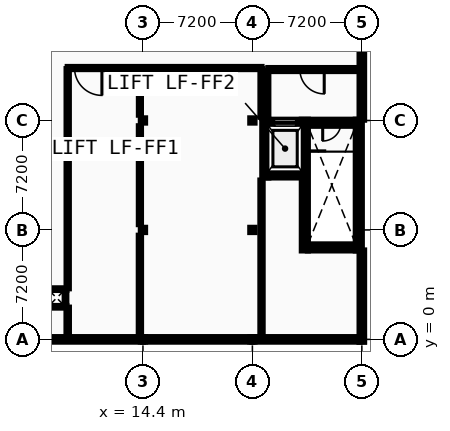
"""IFC4 building model, lengths in metres.
Left out: names, types, materials, properties, quantities, classifications, styles, units other than length and angle.
Written with IfcOpenShell. Run it as: python <this file> out.ifc"""

import sys

from ifc_helpers import new_model, si_unit, direction, frame, frame_2d, origin, origin_2d, place, context, subcontext, project, spatial, rectangle, i_section, extrude, element, fill, save


model = new_model("IFC4")
c1 = context("Model", 3, precision=1e-05, world=origin(), true_north=direction((0.0, 1.0)))
c2 = subcontext(c1, "Body", "Model", "MODEL_VIEW")
j1 = project(units=[si_unit("LENGTHUNIT", "METRE"), si_unit("PLANEANGLEUNIT", "RADIAN")], contexts=[c1])
p1 = place(None, origin())
s1 = spatial("IfcSite", under=j1, at=p1, CompositionType="ELEMENT")
p2 = place(p1, origin())
s2 = spatial("IfcBuilding", under=s1, at=p2, CompositionType="ELEMENT")
p3 = place(p2, frame((0.0, 0.0, 27.2)))
s3 = spatial("IfcBuildingStorey", under=s2, at=p3, CompositionType="ELEMENT", Elevation=27.2)
for number, where, z_axis, x_axis in (
    (1, (14.4, 0.0, 0.0), (0.0, 0.0, 1.0), (1.0, 0.0, 0.0)),
    (2, (14.4, 7.2, 0.0), (0.0, 0.0, 1.0), (1.0, 0.0, 0.0)),
    (3, (14.4, 14.4, 0.0), (0.0, 0.0, 1.0), (1.0, 0.0, 0.0)),
    (4, (21.6, 0.0, 0.0), (0.0, 0.0, 1.0), (1.0, 0.0, 0.0)),
    (5, (21.6, 7.2, 0.0), (0.0, 0.0, 1.0), (1.0, 0.0, 0.0)),
    (6, (21.6, 14.4, 0.0), (0.0, 0.0, 1.0), (1.0, 0.0, 0.0)),
    (7, (28.8, 0.0, 0.0), (0.0, 0.0, 1.0), (1.0, 0.0, 0.0)),
):
    element("IfcColumn", number, at=place(p3, frame(where, z_axis=z_axis, x_axis=x_axis)), inside=s3, PredefinedType="COLUMN", context=c2, shape_type="SweptSolid", body=[
        extrude(i_section(OverallWidth=0.28, OverallDepth=0.28, WebThickness=0.01, FlangeThickness=0.018, FilletRadius=0.024, at=origin_2d()), origin(), (0.0, 0.0, 1.0), 4.4),
    ])
p4 = place(p3, frame((7.2, 0.0, 0.0), z_axis=(0.0, 0.0, 1.0), x_axis=(1.0, 0.0, 0.0)))
e8 = element("IfcWall", 8, at=p4, inside=s3, PredefinedType="STANDARD", context=c2, shape_type="SweptSolid", body=[
    extrude(rectangle(XDim=7.2, YDim=0.3, at=frame_2d((3.6, 0.0))), origin(), (0.0, 0.0, 1.0), 4.035),
])
p5 = place(p4, frame((4.593, 0.0, 0.95)))
e9 = element("IfcOpeningElement", 9, at=p5, cuts=e8, PredefinedType="OPENING", context=c2, shape_type="SweptSolid", body=[
    extrude(rectangle(XDim=0.894, YDim=1.26, at=frame_2d((0.447, 0.63))), frame((0.0, 0.16, 0.0), z_axis=(0.0, -1.0, 0.0), x_axis=(1.0, 0.0, 0.0)), (0.0, 0.0, 1.0), 0.32),
])
p6 = place(p3, frame((14.4, 0.0, 0.0), z_axis=(0.0, 0.0, 1.0), x_axis=(1.0, 0.0, 0.0)))
e10 = element("IfcWall", 10, at=p6, inside=s3, PredefinedType="STANDARD", context=c2, shape_type="SweptSolid", body=[
    extrude(rectangle(XDim=7.2, YDim=0.3, at=frame_2d((3.6, 0.0))), origin(), (0.0, 0.0, 1.0), 4.035),
])
p7 = place(p6, frame((1.696, 0.0, 0.95)))
e11 = element("IfcOpeningElement", 11, at=p7, cuts=e10, PredefinedType="OPENING", context=c2, shape_type="SweptSolid", body=[
    extrude(rectangle(XDim=0.928, YDim=1.26, at=frame_2d((0.464, 0.63))), frame((0.0, 0.16, 0.0), z_axis=(0.0, -1.0, 0.0), x_axis=(1.0, 0.0, 0.0)), (0.0, 0.0, 1.0), 0.32),
])
p8 = place(p6, frame((4.576, 0.0, 0.95)))
e12 = element("IfcOpeningElement", 12, at=p8, cuts=e10, PredefinedType="OPENING", context=c2, shape_type="SweptSolid", body=[
    extrude(rectangle(XDim=0.928, YDim=1.26, at=frame_2d((0.464, 0.63))), frame((0.0, 0.16, 0.0), z_axis=(0.0, -1.0, 0.0), x_axis=(1.0, 0.0, 0.0)), (0.0, 0.0, 1.0), 0.32),
])
p9 = place(p3, frame((21.6, 0.0, 0.0), z_axis=(0.0, 0.0, 1.0), x_axis=(1.0, 0.0, 0.0)))
e13 = element("IfcWall", 13, at=p9, inside=s3, PredefinedType="STANDARD", context=c2, shape_type="SweptSolid", body=[
    extrude(rectangle(XDim=7.05, YDim=0.3, at=frame_2d((3.525, 0.0))), origin(), (0.0, 0.0, 1.0), 4.035),
])
p10 = place(p9, frame((1.634, 0.0, 0.95)))
e14 = element("IfcOpeningElement", 14, at=p10, cuts=e13, PredefinedType="OPENING", context=c2, shape_type="SweptSolid", body=[
    extrude(rectangle(XDim=0.962, YDim=1.26, at=frame_2d((0.481, 0.63))), frame((0.0, 0.16, 0.0), z_axis=(0.0, -1.0, 0.0), x_axis=(1.0, 0.0, 0.0)), (0.0, 0.0, 1.0), 0.32),
])
p11 = place(p9, frame((4.454, 0.0, 0.95)))
e15 = element("IfcOpeningElement", 15, at=p11, cuts=e13, PredefinedType="OPENING", context=c2, shape_type="SweptSolid", body=[
    extrude(rectangle(XDim=0.962, YDim=1.26, at=frame_2d((0.481, 0.63))), frame((0.0, 0.16, 0.0), z_axis=(0.0, -1.0, 0.0), x_axis=(1.0, 0.0, 0.0)), (0.0, 0.0, 1.0), 0.32),
])
p12 = place(p3, frame((28.8, -0.15, 0.0), z_axis=(0.0, 0.0, 1.0), x_axis=(0.0, 1.0, 0.0)))
e16 = element("IfcWall", 16, at=p12, inside=s3, PredefinedType="STANDARD", context=c2, shape_type="SweptSolid", body=[
    extrude(rectangle(XDim=6.0, YDim=0.3, at=frame_2d((3.0, 0.0))), origin(), (0.0, 0.0, 1.0), 4.18),
])
p13 = place(p12, frame((2.4, 0.0, 0.95)))
e17 = element("IfcOpeningElement", 17, at=p13, cuts=e16, PredefinedType="OPENING", context=c2, shape_type="SweptSolid", body=[
    extrude(rectangle(XDim=1.2, YDim=1.26, at=frame_2d((0.6, 0.63))), frame((0.0, 0.16, 0.0), z_axis=(0.0, -1.0, 0.0), x_axis=(1.0, 0.0, 0.0)), (0.0, 0.0, 1.0), 0.32),
])
p14 = place(p3, frame((28.8, 14.45, 0.0), z_axis=(0.0, 0.0, 1.0), x_axis=(0.0, 1.0, 0.0)))
e18 = element("IfcWall", 18, at=p14, inside=s3, PredefinedType="STANDARD", context=c2, shape_type="SweptSolid", body=[
    extrude(rectangle(XDim=7.15, YDim=0.3, at=frame_2d((3.575, 0.0))), origin(), (0.0, 0.0, 1.0), 4.18),
])
p15 = place(p14, frame((1.528, 0.0, 0.95)))
e19 = element("IfcOpeningElement", 19, at=p15, cuts=e18, PredefinedType="OPENING", context=c2, shape_type="SweptSolid", body=[
    extrude(rectangle(XDim=1.234, YDim=1.26, at=frame_2d((0.617, 0.63))), frame((0.0, 0.16, 0.0), z_axis=(0.0, -1.0, 0.0), x_axis=(1.0, 0.0, 0.0)), (0.0, 0.0, 1.0), 0.32),
])
p16 = place(p14, frame((4.388, 0.0, 0.95)))
e20 = element("IfcOpeningElement", 20, at=p16, cuts=e18, PredefinedType="OPENING", context=c2, shape_type="SweptSolid", body=[
    extrude(rectangle(XDim=1.234, YDim=1.26, at=frame_2d((0.617, 0.63))), frame((0.0, 0.16, 0.0), z_axis=(0.0, -1.0, 0.0), x_axis=(1.0, 0.0, 0.0)), (0.0, 0.0, 1.0), 0.32),
])
p17 = place(p3, frame((25.25, 6.05, 0.0), z_axis=(0.0, 0.0, 1.0), x_axis=(1.0, 0.0, 0.0)))
e21 = element("IfcWall", 21, at=p17, inside=s3, PredefinedType="SHEAR", context=c2, shape_type="SweptSolid", body=[
    extrude(rectangle(XDim=3.15, YDim=0.4, at=frame_2d((1.575, 0.0))), origin(), (0.0, 0.0, 1.0), 4.18),
])
p18 = place(p3, frame((25.25, 14.25, 0.0), z_axis=(0.0, 0.0, 1.0), x_axis=(1.0, 0.0, 0.0)))
e22 = element("IfcWall", 22, at=p18, inside=s3, PredefinedType="SHEAR", context=c2, shape_type="SweptSolid", body=[
    extrude(rectangle(XDim=3.15, YDim=0.4, at=frame_2d((1.575, 0.0))), origin(), (0.0, 0.0, 1.0), 4.18),
])
p19 = place(p18, frame((0.975, 0.0, 0.0)))
e23 = element("IfcOpeningElement", 23, at=p19, cuts=e22, PredefinedType="OPENING", context=c2, shape_type="SweptSolid", body=[
    extrude(rectangle(XDim=1.2, YDim=2.15, at=frame_2d((0.6, 1.075))), frame((0.0, 0.21, 0.0), z_axis=(0.0, -1.0, 0.0), x_axis=(1.0, 0.0, 0.0)), (0.0, 0.0, 1.0), 0.42),
])
for number, where, z_axis, x_axis in (
    (24, (25.05, 5.85, 0.0), (0.0, 0.0, 1.0), (0.0, 1.0, 0.0)),
    (25, (28.6, 5.85, 0.0), (0.0, 0.0, 1.0), (0.0, 1.0, 0.0)),
):
    element("IfcWall", number, at=place(p3, frame(where, z_axis=z_axis, x_axis=x_axis)), inside=s3, PredefinedType="SHEAR", context=c2, shape_type="SweptSolid", body=[
        extrude(rectangle(XDim=8.6, YDim=0.4, at=frame_2d((4.3, 0.0))), origin(), (0.0, 0.0, 1.0), 4.18),
    ])
p20 = place(p3, frame((22.65, 10.85, 0.0), z_axis=(0.0, 0.0, 1.0), x_axis=(1.0, 0.0, 0.0)))
e26 = element("IfcWall", 26, at=p20, inside=s3, PredefinedType="SHEAR", context=c2, shape_type="SweptSolid", body=[
    extrude(rectangle(XDim=2.2, YDim=0.4, at=frame_2d((1.1, 0.0))), origin(), (0.0, 0.0, 1.0), 4.18),
])
p21 = place(p3, frame((22.65, 14.25, 0.0), z_axis=(0.0, 0.0, 1.0), x_axis=(1.0, 0.0, 0.0)))
e27 = element("IfcWall", 27, at=p21, inside=s3, PredefinedType="SHEAR", context=c2, shape_type="SweptSolid", body=[
    extrude(rectangle(XDim=2.2, YDim=0.4, at=frame_2d((1.1, 0.0))), origin(), (0.0, 0.0, 1.0), 4.18),
])
p22 = place(p21, frame((0.4, 0.0, 0.0)))
e28 = element("IfcOpeningElement", 28, at=p22, cuts=e27, PredefinedType="OPENING", context=c2, shape_type="SweptSolid", body=[
    extrude(rectangle(XDim=1.4, YDim=2.2, at=frame_2d((0.7, 1.1))), frame((0.0, 0.21, 0.0), z_axis=(0.0, -1.0, 0.0), x_axis=(1.0, 0.0, 0.0)), (0.0, 0.0, 1.0), 0.42),
])
p23 = place(p3, frame((22.45, 10.65, 0.0), z_axis=(0.0, 0.0, 1.0), x_axis=(0.0, 1.0, 0.0)))
e29 = element("IfcWall", 29, at=p23, inside=s3, PredefinedType="SHEAR", context=c2, shape_type="SweptSolid", body=[
    extrude(rectangle(XDim=3.8, YDim=0.4, at=frame_2d((1.9, 0.0))), origin(), (0.0, 0.0, 1.0), 4.18),
])
p24 = place(p3, frame((22.65, 17.75, 0.0), z_axis=(0.0, 0.0, 1.0), x_axis=(1.0, 0.0, 0.0)))
e30 = element("IfcWall", 30, at=p24, inside=s3, PredefinedType="PARTITIONING", context=c2, shape_type="SweptSolid", body=[
    extrude(rectangle(XDim=5.75, YDim=0.2, at=frame_2d((2.875, 0.0))), origin(), (0.0, 0.0, 1.0), 4.18),
])
p25 = place(p24, frame((2.075, 0.0, 0.0)))
e31 = element("IfcOpeningElement", 31, at=p25, cuts=e30, PredefinedType="OPENING", context=c2, shape_type="SweptSolid", body=[
    extrude(rectangle(XDim=1.6, YDim=2.2, at=frame_2d((0.8, 1.1))), frame((0.0, 0.11, 0.0), z_axis=(0.0, -1.0, 0.0), x_axis=(1.0, 0.0, 0.0)), (0.0, 0.0, 1.0), 0.22),
])
p26 = place(p3, frame((22.55, 14.45, 0.0), z_axis=(0.0, 0.0, 1.0), x_axis=(0.0, 1.0, 0.0)))
e32 = element("IfcWall", 32, at=p26, inside=s3, PredefinedType="PARTITIONING", context=c2, shape_type="SweptSolid", body=[
    extrude(rectangle(XDim=3.2, YDim=0.2, at=frame_2d((1.6, 0.0))), origin(), (0.0, 0.0, 1.0), 4.18),
])
for number, where, z_axis, x_axis in (
    (33, (8.09, 2.145, 0.0), (0.0, 0.0, 1.0), (1.0, 0.0, 0.0)),
    (34, (8.09, 3.305, 0.0), (0.0, 0.0, 1.0), (1.0, 0.0, 0.0)),
):
    element("IfcWall", number, at=place(p3, frame(where, z_axis=z_axis, x_axis=x_axis)), inside=s3, PredefinedType="PARTITIONING", context=c2, shape_type="SweptSolid", body=[
        extrude(rectangle(XDim=1.27, YDim=0.11, at=frame_2d((0.635, 0.0))), origin(), (0.0, 0.0, 1.0), 4.18),
    ])
p27 = place(p3, frame((9.305, 2.2, 0.0), z_axis=(0.0, 0.0, 1.0), x_axis=(0.0, 1.0, 0.0)))
e35 = element("IfcWall", 35, at=p27, inside=s3, PredefinedType="PARTITIONING", context=c2, shape_type="SweptSolid", body=[
    extrude(rectangle(XDim=1.05, YDim=0.11, at=frame_2d((0.525, 0.0))), origin(), (0.0, 0.0, 1.0), 4.18),
])
p28 = place(p3, frame((9.45, 17.85, 0.0), z_axis=(0.0, 0.0, 1.0), x_axis=(1.0, 0.0, 0.0)))
e36 = element("IfcWall", 36, at=p28, inside=s3, PredefinedType="PARTITIONING", context=c2, shape_type="SweptSolid", body=[
    extrude(rectangle(XDim=12.75, YDim=0.142, at=frame_2d((6.375, 0.0))), origin(), (0.0, 0.0, 1.0), 4.18),
])
p29 = place(p28, frame((0.45, 0.0, 0.0)))
e37 = element("IfcOpeningElement", 37, at=p29, cuts=e36, PredefinedType="OPENING", context=c2, shape_type="SweptSolid", body=[
    extrude(rectangle(XDim=1.8, YDim=2.3, at=frame_2d((0.9, 1.15))), frame((0.0, 0.081, 0.0), z_axis=(0.0, -1.0, 0.0), x_axis=(1.0, 0.0, 0.0)), (0.0, 0.0, 1.0), 0.162),
])
p30 = place(p28, frame((8.18, 0.0, 0.0)))
e38 = element("IfcOpeningElement", 38, at=p30, cuts=e36, PredefinedType="OPENING", context=c2, shape_type="SweptSolid", body=[
    extrude(rectangle(XDim=1.14, YDim=2.096, at=frame_2d((0.57, 1.048))), frame((0.0, 0.081, 0.0), z_axis=(0.0, -1.0, 0.0), x_axis=(1.0, 0.0, 0.0)), (0.0, 0.0, 1.0), 0.162),
])
p31 = place(p3, frame((9.45, 0.2, 0.0), z_axis=(0.0, 0.0, 1.0), x_axis=(0.0, 1.0, 0.0)))
e39 = element("IfcWall", 39, at=p31, inside=s3, PredefinedType="PARTITIONING", context=c2, shape_type="SweptSolid", body=[
    extrude(rectangle(XDim=1.89, YDim=0.16, at=frame_2d((0.945, 0.0))), origin(), (0.0, 0.0, 1.0), 4.18),
])
p32 = place(p3, frame((9.45, 3.36, 0.0), z_axis=(0.0, 0.0, 1.0), x_axis=(0.0, 1.0, 0.0)))
e40 = element("IfcWall", 40, at=p32, inside=s3, PredefinedType="PARTITIONING", context=c2, shape_type="SweptSolid", body=[
    extrude(rectangle(XDim=14.419, YDim=0.15, at=frame_2d((7.209, 0.0))), origin(), (0.0, 0.0, 1.0), 4.18),
])
p33 = place(p3, frame((14.2, 0.38, 0.0), z_axis=(0.0, 0.0, 1.0), x_axis=(0.0, 1.0, 0.0)))
e41 = element("IfcWall", 41, at=p33, inside=s3, PredefinedType="PARTITIONING", context=c2, shape_type="SweptSolid", body=[
    extrude(rectangle(XDim=6.44, YDim=0.15, at=frame_2d((3.22, 0.0))), origin(), (0.0, 0.0, 1.0), 4.18),
])
p34 = place(p3, frame((14.2, 7.58, 0.0), z_axis=(0.0, 0.0, 1.0), x_axis=(0.0, 1.0, 0.0)))
e42 = element("IfcWall", 42, at=p34, inside=s3, PredefinedType="PARTITIONING", context=c2, shape_type="SweptSolid", body=[
    extrude(rectangle(XDim=6.44, YDim=0.142, at=frame_2d((3.22, 0.0))), origin(), (0.0, 0.0, 1.0), 4.18),
])
p35 = place(p3, frame((14.2, 14.78, 0.0), z_axis=(0.0, 0.0, 1.0), x_axis=(0.0, 1.0, 0.0)))
e43 = element("IfcWall", 43, at=p35, inside=s3, PredefinedType="PARTITIONING", context=c2, shape_type="SweptSolid", body=[
    extrude(rectangle(XDim=2.999, YDim=0.135, at=frame_2d((1.5, 0.0))), origin(), (0.0, 0.0, 1.0), 4.18),
])
p36 = place(p3, frame((22.2, 0.2, 0.0), z_axis=(0.0, 0.0, 1.0), x_axis=(0.0, 1.0, 0.0)))
e44 = element("IfcWall", 44, at=p36, inside=s3, PredefinedType="PARTITIONING", context=c2, shape_type="SweptSolid", body=[
    extrude(rectangle(XDim=10.25, YDim=0.15, at=frame_2d((5.125, 0.0))), origin(), (0.0, 0.0, 1.0), 4.18),
])
p37 = place(p3, frame((22.2, 14.65, 0.0), z_axis=(0.0, 0.0, 1.0), x_axis=(0.0, 1.0, 0.0)))
e45 = element("IfcWall", 45, at=p37, inside=s3, PredefinedType="PARTITIONING", context=c2, shape_type="SweptSolid", body=[
    extrude(rectangle(XDim=3.129, YDim=0.142, at=frame_2d((1.564, 0.0))), origin(), (0.0, 0.0, 1.0), 4.18),
])
p38 = place(p5, origin())
e46 = element("IfcWindow", 46, at=p38, inside=s3, PartitioningType="SINGLE_PANEL", PredefinedType="WINDOW", context=c2, shape_type="SweptSolid", body=[
    extrude(rectangle(XDim=0.894, YDim=1.26, at=frame_2d((0.447, 0.63))), frame((0.0, 0.03, 0.0), z_axis=(0.0, -1.0, 0.0), x_axis=(1.0, 0.0, 0.0)), (0.0, 0.0, 1.0), 0.06),
])
fill(e9, e46)
p39 = place(p7, origin())
e47 = element("IfcWindow", 47, at=p39, inside=s3, PartitioningType="SINGLE_PANEL", PredefinedType="WINDOW", context=c2, shape_type="SweptSolid", body=[
    extrude(rectangle(XDim=0.928, YDim=1.26, at=frame_2d((0.464, 0.63))), frame((0.0, 0.03, 0.0), z_axis=(0.0, -1.0, 0.0), x_axis=(1.0, 0.0, 0.0)), (0.0, 0.0, 1.0), 0.06),
])
fill(e11, e47)
p40 = place(p8, origin())
e48 = element("IfcWindow", 48, at=p40, inside=s3, PartitioningType="SINGLE_PANEL", PredefinedType="WINDOW", context=c2, shape_type="SweptSolid", body=[
    extrude(rectangle(XDim=0.928, YDim=1.26, at=frame_2d((0.464, 0.63))), frame((0.0, 0.03, 0.0), z_axis=(0.0, -1.0, 0.0), x_axis=(1.0, 0.0, 0.0)), (0.0, 0.0, 1.0), 0.06),
])
fill(e12, e48)
p41 = place(p10, origin())
e49 = element("IfcWindow", 49, at=p41, inside=s3, PartitioningType="SINGLE_PANEL", PredefinedType="WINDOW", context=c2, shape_type="SweptSolid", body=[
    extrude(rectangle(XDim=0.962, YDim=1.26, at=frame_2d((0.481, 0.63))), frame((0.0, 0.03, 0.0), z_axis=(0.0, -1.0, 0.0), x_axis=(1.0, 0.0, 0.0)), (0.0, 0.0, 1.0), 0.06),
])
fill(e14, e49)
p42 = place(p11, origin())
e50 = element("IfcWindow", 50, at=p42, inside=s3, PartitioningType="SINGLE_PANEL", PredefinedType="WINDOW", context=c2, shape_type="SweptSolid", body=[
    extrude(rectangle(XDim=0.962, YDim=1.26, at=frame_2d((0.481, 0.63))), frame((0.0, 0.03, 0.0), z_axis=(0.0, -1.0, 0.0), x_axis=(1.0, 0.0, 0.0)), (0.0, 0.0, 1.0), 0.06),
])
fill(e15, e50)
p43 = place(p13, origin())
e51 = element("IfcWindow", 51, at=p43, inside=s3, PartitioningType="SINGLE_PANEL", PredefinedType="WINDOW", context=c2, shape_type="SweptSolid", body=[
    extrude(rectangle(XDim=1.2, YDim=1.26, at=frame_2d((0.6, 0.63))), frame((0.0, 0.03, 0.0), z_axis=(0.0, -1.0, 0.0), x_axis=(1.0, 0.0, 0.0)), (0.0, 0.0, 1.0), 0.06),
])
fill(e17, e51)
p44 = place(p15, origin())
e52 = element("IfcWindow", 52, at=p44, inside=s3, PartitioningType="SINGLE_PANEL", PredefinedType="WINDOW", context=c2, shape_type="SweptSolid", body=[
    extrude(rectangle(XDim=1.234, YDim=1.26, at=frame_2d((0.617, 0.63))), frame((0.0, 0.03, 0.0), z_axis=(0.0, -1.0, 0.0), x_axis=(1.0, 0.0, 0.0)), (0.0, 0.0, 1.0), 0.06),
])
fill(e19, e52)
p45 = place(p16, origin())
e53 = element("IfcWindow", 53, at=p45, inside=s3, PartitioningType="SINGLE_PANEL", PredefinedType="WINDOW", context=c2, shape_type="SweptSolid", body=[
    extrude(rectangle(XDim=1.234, YDim=1.26, at=frame_2d((0.617, 0.63))), frame((0.0, 0.03, 0.0), z_axis=(0.0, -1.0, 0.0), x_axis=(1.0, 0.0, 0.0)), (0.0, 0.0, 1.0), 0.06),
])
fill(e20, e53)
p46 = place(p19, frame((1.2, 0.0, 0.0), z_axis=(0.0, 0.0, 1.0), x_axis=(-1.0, 0.0, 0.0)))
e54 = element("IfcDoor", 54, at=p46, inside=s3, OperationType="SINGLE_SWING_LEFT", PredefinedType="DOOR", context=c2, shape_type="SweptSolid", body=[
    extrude(rectangle(XDim=1.2, YDim=2.15, at=frame_2d((0.6, 1.075))), frame((0.0, 0.025, 0.0), z_axis=(0.0, -1.0, 0.0), x_axis=(1.0, 0.0, 0.0)), (0.0, 0.0, 1.0), 0.05),
])
fill(e23, e54)
p47 = place(p22, origin())
e55 = element("IfcDoor", 55, at=p47, inside=s3, OperationType="SLIDING_TO_LEFT", PredefinedType="DOOR", context=c2, shape_type="SweptSolid", body=[
    extrude(rectangle(XDim=1.4, YDim=2.2, at=frame_2d((0.7, 1.1))), frame((0.0, 0.025, 0.0), z_axis=(0.0, -1.0, 0.0), x_axis=(1.0, 0.0, 0.0)), (0.0, 0.0, 1.0), 0.05),
])
fill(e28, e55)
p48 = place(p25, origin())
e56 = element("IfcDoor", 56, at=p48, inside=s3, OperationType="DOUBLE_DOOR_SINGLE_SWING", PredefinedType="DOOR", context=c2, shape_type="SweptSolid", body=[
    extrude(rectangle(XDim=1.6, YDim=2.2, at=frame_2d((0.8, 1.1))), frame((0.0, 0.025, 0.0), z_axis=(0.0, -1.0, 0.0), x_axis=(1.0, 0.0, 0.0)), (0.0, 0.0, 1.0), 0.05),
])
fill(e31, e56)
p49 = place(p29, origin())
e57 = element("IfcDoor", 57, at=p49, inside=s3, OperationType="DOUBLE_DOOR_SINGLE_SWING", PredefinedType="DOOR", context=c2, shape_type="SweptSolid", body=[
    extrude(rectangle(XDim=1.8, YDim=2.3, at=frame_2d((0.9, 1.15))), frame((0.0, 0.025, 0.0), z_axis=(0.0, -1.0, 0.0), x_axis=(1.0, 0.0, 0.0)), (0.0, 0.0, 1.0), 0.05),
])
fill(e37, e57)
p50 = place(p30, origin())
e58 = element("IfcDoor", 58, at=p50, inside=s3, OperationType="SINGLE_SWING_RIGHT", PredefinedType="DOOR", context=c2, shape_type="SweptSolid", body=[
    extrude(rectangle(XDim=1.14, YDim=2.096, at=frame_2d((0.57, 1.048))), frame((0.0, 0.025, 0.0), z_axis=(0.0, -1.0, 0.0), x_axis=(1.0, 0.0, 0.0)), (0.0, 0.0, 1.0), 0.05),
])
fill(e38, e58)
save(model, sys.argv[1])
